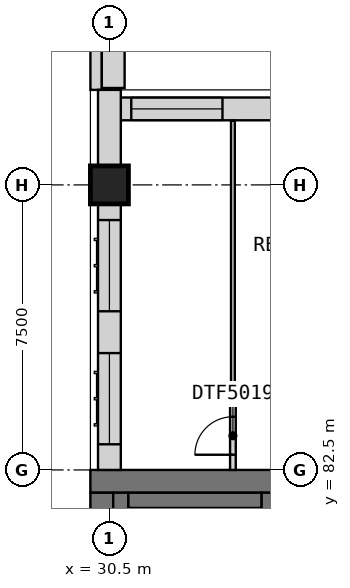
"""IFC4 building model, lengths in metres.
Left out: names, types, materials, properties, quantities, classifications, styles, units other than length and angle.
Written with IfcOpenShell. Run it as: python <this file> out.ifc"""

import sys

from ifc_helpers import new_model, si_unit, direction, frame, frame_2d, origin, origin_2d, place, context, subcontext, project, spatial, rectangle, extrude, element, fill, save


model = new_model("IFC4")
c1 = context("Model", 3, precision=1e-05, world=origin(), true_north=direction((0.0, 1.0)))
c2 = subcontext(c1, "Body", "Model", "MODEL_VIEW")
j1 = project(units=[si_unit("LENGTHUNIT", "METRE"), si_unit("PLANEANGLEUNIT", "RADIAN")], contexts=[c1])
p1 = place(None, origin())
s1 = spatial("IfcSite", under=j1, at=p1, CompositionType="ELEMENT")
p2 = place(p1, origin())
s2 = spatial("IfcBuilding", under=s1, at=p2, CompositionType="ELEMENT")
p3 = place(p2, frame((0.0, 0.0, 219.7)))
s3 = spatial("IfcBuildingStorey", under=s2, at=p3, CompositionType="ELEMENT", Elevation=219.7)
p4 = place(p3, frame((30.5, 90.0, 0.0), z_axis=(0.0, 0.0, 1.0), x_axis=(1.0, 0.0, 0.0)))
e1 = element("IfcColumn", 1, at=p4, inside=s3, PredefinedType="COLUMN", context=c2, shape_type="SweptSolid", body=[
    extrude(rectangle(XDim=1.0, YDim=1.0, at=origin_2d()), origin(), (0.0, 0.0, 1.0), 3.5),
])
p5 = place(p3, frame((30.0, 82.2, 0.0), z_axis=(0.0, 0.0, 1.0), x_axis=(1.0, 0.0, 0.0)))
e2 = element("IfcWall", 2, at=p5, inside=s3, PredefinedType="SHEAR", context=c2, shape_type="SweptSolid", body=[
    extrude(rectangle(XDim=30.0, YDim=0.6, at=frame_2d((15.0, 0.0))), origin(), (0.0, 0.0, 1.0), 3.5),
])
p6 = place(p3, frame((30.3, 60.6, 0.0), z_axis=(0.0, 0.0, 1.0), x_axis=(0.0, 1.0, 0.0)))
e3 = element("IfcWall", 3, at=p6, inside=s3, PredefinedType="SHEAR", context=c2, shape_type="SweptSolid", body=[
    extrude(rectangle(XDim=21.3, YDim=0.6, at=frame_2d((10.65, 0.0))), origin(), (0.0, 0.0, 1.0), 3.5),
])
p7 = place(p3, frame((34.75, 78.3, 0.0), z_axis=(0.0, 0.0, 1.0), x_axis=(0.0, 1.0, 0.0)))
e4 = element("IfcWall", 4, at=p7, inside=s3, PredefinedType="SHEAR", context=c2, shape_type="SweptSolid", body=[
    extrude(rectangle(XDim=3.6, YDim=0.5, at=frame_2d((1.8, 0.0))), origin(), (0.0, 0.0, 1.0), 3.5),
])
p8 = place(p3, frame((30.15, 92.5, 0.0), z_axis=(0.0, 0.0, 1.0), x_axis=(0.0, 1.0, 0.0)))
e5 = element("IfcWall", 5, at=p8, inside=s3, PredefinedType="PARAPET", context=c2, shape_type="SweptSolid", body=[
    extrude(rectangle(XDim=4.25, YDim=0.3, at=frame_2d((2.125, 0.0))), origin(), (0.0, 0.0, 1.0), 1.2),
])
p9 = place(p3, frame((30.6, 96.75, 0.0), z_axis=(0.0, 0.0, 1.0), x_axis=(0.0, -1.0, 0.0)))
e6 = element("IfcWall", 6, at=p9, inside=s3, PredefinedType="STANDARD", context=c2, shape_type="SweptSolid", body=[
    extrude(rectangle(XDim=4.2, YDim=0.6, at=frame_2d((2.1, 0.0))), origin(), (0.0, 0.0, 1.0), 0.6),
])
p10 = place(p3, frame((34.906, 92.0, 0.0), z_axis=(0.0, 0.0, 1.0), x_axis=(-1.0, 0.0, 0.0)))
e7 = element("IfcWall", 7, at=p10, inside=s3, PredefinedType="SOLIDWALL", context=c2, shape_type="SweptSolid", body=[
    extrude(rectangle(XDim=4.106, YDim=0.6, at=frame_2d((2.053, 0.0))), origin(), (0.0, 0.0, 1.0), 3.25),
])
p11 = place(p10, frame((1.431, 0.0, 0.8)))
e8 = element("IfcOpeningElement", 8, at=p11, cuts=e7, PredefinedType="OPENING", context=c2, shape_type="SweptSolid", body=[
    extrude(rectangle(XDim=2.4, YDim=1.8, at=frame_2d((1.2, 0.9))), frame((0.0, 0.31, 0.0), z_axis=(0.0, -1.0, 0.0), x_axis=(1.0, 0.0, 0.0)), (0.0, 0.0, 1.0), 0.62),
])
p12 = place(p3, frame((30.5, 92.5, 0.0), z_axis=(0.0, 0.0, 1.0), x_axis=(0.0, -1.0, 0.0)))
e9 = element("IfcWall", 9, at=p12, inside=s3, PredefinedType="SOLIDWALL", context=c2, shape_type="SweptSolid", body=[
    extrude(rectangle(XDim=2.0, YDim=0.6, at=frame_2d((1.0, 0.0))), origin(), (0.0, 0.0, 1.0), 3.25),
])
p13 = place(p3, frame((30.5, 89.5, 0.0), z_axis=(0.0, 0.0, 1.0), x_axis=(0.0, -1.0, 0.0)))
e10 = element("IfcWall", 10, at=p13, inside=s3, PredefinedType="SOLIDWALL", context=c2, shape_type="SweptSolid", body=[
    extrude(rectangle(XDim=7.0, YDim=0.6, at=frame_2d((3.5, 0.0))), origin(), (0.0, 0.0, 1.0), 3.25),
])
p14 = place(p13, frame((3.925, 0.0, 0.8)))
e11 = element("IfcOpeningElement", 11, at=p14, cuts=e10, PredefinedType="OPENING", context=c2, shape_type="SweptSolid", body=[
    extrude(rectangle(XDim=2.4, YDim=1.8, at=frame_2d((1.2, 0.9))), frame((0.0, 0.31, 0.0), z_axis=(0.0, -1.0, 0.0), x_axis=(1.0, 0.0, 0.0)), (0.0, 0.0, 1.0), 0.62),
])
p15 = place(p13, frame((0.425, 0.0, 0.8)))
e12 = element("IfcOpeningElement", 12, at=p15, cuts=e10, PredefinedType="OPENING", context=c2, shape_type="SweptSolid", body=[
    extrude(rectangle(XDim=2.4, YDim=1.8, at=frame_2d((1.2, 0.9))), frame((0.0, 0.31, 0.0), z_axis=(0.0, -1.0, 0.0), x_axis=(1.0, 0.0, 0.0)), (0.0, 0.0, 1.0), 0.62),
])
p16 = place(p3, frame((30.8, 60.6, 0.0), z_axis=(0.0, 0.0, 1.0), x_axis=(0.0, 1.0, 0.0)))
e13 = element("IfcWall", 13, at=p16, inside=s3, PredefinedType="SOLIDWALL", context=c2, shape_type="SweptSolid", body=[
    extrude(rectangle(XDim=21.3, YDim=0.4, at=frame_2d((10.65, 0.0))), origin(), (0.0, 0.0, 1.0), 3.25),
])
p17 = place(p3, frame((31.0, 81.7, 0.0), z_axis=(0.0, 0.0, 1.0), x_axis=(1.0, 0.0, 0.0)))
e14 = element("IfcWall", 14, at=p17, inside=s3, PredefinedType="SOLIDWALL", context=c2, shape_type="SweptSolid", body=[
    extrude(rectangle(XDim=3.5, YDim=0.4, at=frame_2d((1.75, 0.0))), origin(), (0.0, 0.0, 1.0), 3.25),
])
p18 = place(p3, frame((33.75, 84.3, 0.0), z_axis=(0.0, 0.0, 1.0), x_axis=(1.0, 0.0, 0.0)))
e15 = element("IfcWall", 15, at=p18, inside=s3, PredefinedType="PARTITIONING", context=c2, shape_type="SweptSolid", body=[
    extrude(rectangle(XDim=28.05, YDim=0.15, at=frame_2d((14.025, 0.0))), origin(), (0.0, 0.0, 1.0), 3.25),
])
p19 = place(p18, frame((3.25, 0.0, 0.0)))
e16 = element("IfcOpeningElement", 16, at=p19, cuts=e15, PredefinedType="OPENING", context=c2, shape_type="SweptSolid", body=[
    extrude(rectangle(XDim=1.0, YDim=2.1, at=frame_2d((0.5, 1.05))), frame((0.0, 0.085, 0.0), z_axis=(0.0, -1.0, 0.0), x_axis=(1.0, 0.0, 0.0)), (0.0, 0.0, 1.0), 0.17),
])
p20 = place(p18, frame((8.925, 0.0, 0.0)))
e17 = element("IfcOpeningElement", 17, at=p20, cuts=e15, PredefinedType="OPENING", context=c2, shape_type="SweptSolid", body=[
    extrude(rectangle(XDim=0.9, YDim=2.1, at=frame_2d((0.45, 1.05))), frame((0.0, 0.085, 0.0), z_axis=(0.0, -1.0, 0.0), x_axis=(1.0, 0.0, 0.0)), (0.0, 0.0, 1.0), 0.17),
])
p21 = place(p18, frame((20.175, 0.0, 0.0)))
e18 = element("IfcOpeningElement", 18, at=p21, cuts=e15, PredefinedType="OPENING", context=c2, shape_type="SweptSolid", body=[
    extrude(rectangle(XDim=0.9, YDim=2.1, at=frame_2d((0.45, 1.05))), frame((0.0, 0.085, 0.0), z_axis=(0.0, -1.0, 0.0), x_axis=(1.0, 0.0, 0.0)), (0.0, 0.0, 1.0), 0.17),
])
p22 = place(p18, frame((26.65, 0.0, 0.0)))
e19 = element("IfcOpeningElement", 19, at=p22, cuts=e15, PredefinedType="OPENING", context=c2, shape_type="SweptSolid", body=[
    extrude(rectangle(XDim=1.0, YDim=2.1, at=frame_2d((0.5, 1.05))), frame((0.0, 0.085, 0.0), z_axis=(0.0, -1.0, 0.0), x_axis=(1.0, 0.0, 0.0)), (0.0, 0.0, 1.0), 0.17),
])
p23 = place(p3, frame((33.75, 82.5, 0.0), z_axis=(0.0, 0.0, 1.0), x_axis=(0.0, 1.0, 0.0)))
e20 = element("IfcWall", 20, at=p23, inside=s3, PredefinedType="PARTITIONING", context=c2, shape_type="SweptSolid", body=[
    extrude(rectangle(XDim=1.725, YDim=0.15, at=frame_2d((0.863, 0.0))), origin(), (0.0, 0.0, 1.0), 3.25),
])
p24 = place(p23, frame((0.4, 0.0, 0.0)))
e21 = element("IfcOpeningElement", 21, at=p24, cuts=e20, PredefinedType="OPENING", context=c2, shape_type="SweptSolid", body=[
    extrude(rectangle(XDim=1.0, YDim=2.1, at=frame_2d((0.5, 1.05))), frame((0.0, 0.085, 0.0), z_axis=(0.0, -1.0, 0.0), x_axis=(1.0, 0.0, 0.0)), (0.0, 0.0, 1.0), 0.17),
])
p25 = place(p3, frame((33.75, 84.375, 0.0), z_axis=(0.0, 0.0, 1.0), x_axis=(0.0, 1.0, 0.0)))
e22 = element("IfcWall", 22, at=p25, inside=s3, PredefinedType="PARTITIONING", context=c2, shape_type="SweptSolid", body=[
    extrude(rectangle(XDim=7.315, YDim=0.1, at=frame_2d((3.657, 0.0))), origin(), (0.0, 0.0, 1.0), 3.25),
])
p26 = place(p11, origin())
e23 = element("IfcWindow", 23, at=p26, inside=s3, PartitioningType="SINGLE_PANEL", PredefinedType="WINDOW", context=c2, shape_type="SweptSolid", body=[
    extrude(rectangle(XDim=2.4, YDim=1.8, at=frame_2d((1.2, 0.9))), frame((0.0, -0.07, 0.0), z_axis=(0.0, -1.0, 0.0), x_axis=(1.0, 0.0, 0.0)), (0.0, 0.0, 1.0), 0.06),
])
fill(e8, e23)
p27 = place(p14, origin())
e24 = element("IfcWindow", 24, at=p27, inside=s3, PartitioningType="SINGLE_PANEL", PredefinedType="WINDOW", context=c2, shape_type="SweptSolid", body=[
    extrude(rectangle(XDim=2.4, YDim=1.8, at=frame_2d((1.2, 0.9))), frame((0.0, -0.07, 0.0), z_axis=(0.0, -1.0, 0.0), x_axis=(1.0, 0.0, 0.0)), (0.0, 0.0, 1.0), 0.06),
])
fill(e11, e24)
p28 = place(p15, origin())
e25 = element("IfcWindow", 25, at=p28, inside=s3, PartitioningType="SINGLE_PANEL", PredefinedType="WINDOW", context=c2, shape_type="SweptSolid", body=[
    extrude(rectangle(XDim=2.4, YDim=1.8, at=frame_2d((1.2, 0.9))), frame((0.0, -0.07, 0.0), z_axis=(0.0, -1.0, 0.0), x_axis=(1.0, 0.0, 0.0)), (0.0, 0.0, 1.0), 0.06),
])
fill(e12, e25)
p29 = place(p24, origin())
e26 = element("IfcDoor", 26, at=p29, inside=s3, OperationType="SINGLE_SWING_LEFT", PredefinedType="DOOR", context=c2, shape_type="SweptSolid", body=[
    extrude(rectangle(XDim=1.0, YDim=2.1, at=frame_2d((0.5, 1.05))), frame((0.0, 0.025, 0.0), z_axis=(0.0, -1.0, 0.0), x_axis=(1.0, 0.0, 0.0)), (0.0, 0.0, 1.0), 0.05),
])
fill(e21, e26)
save(model, sys.argv[1])
